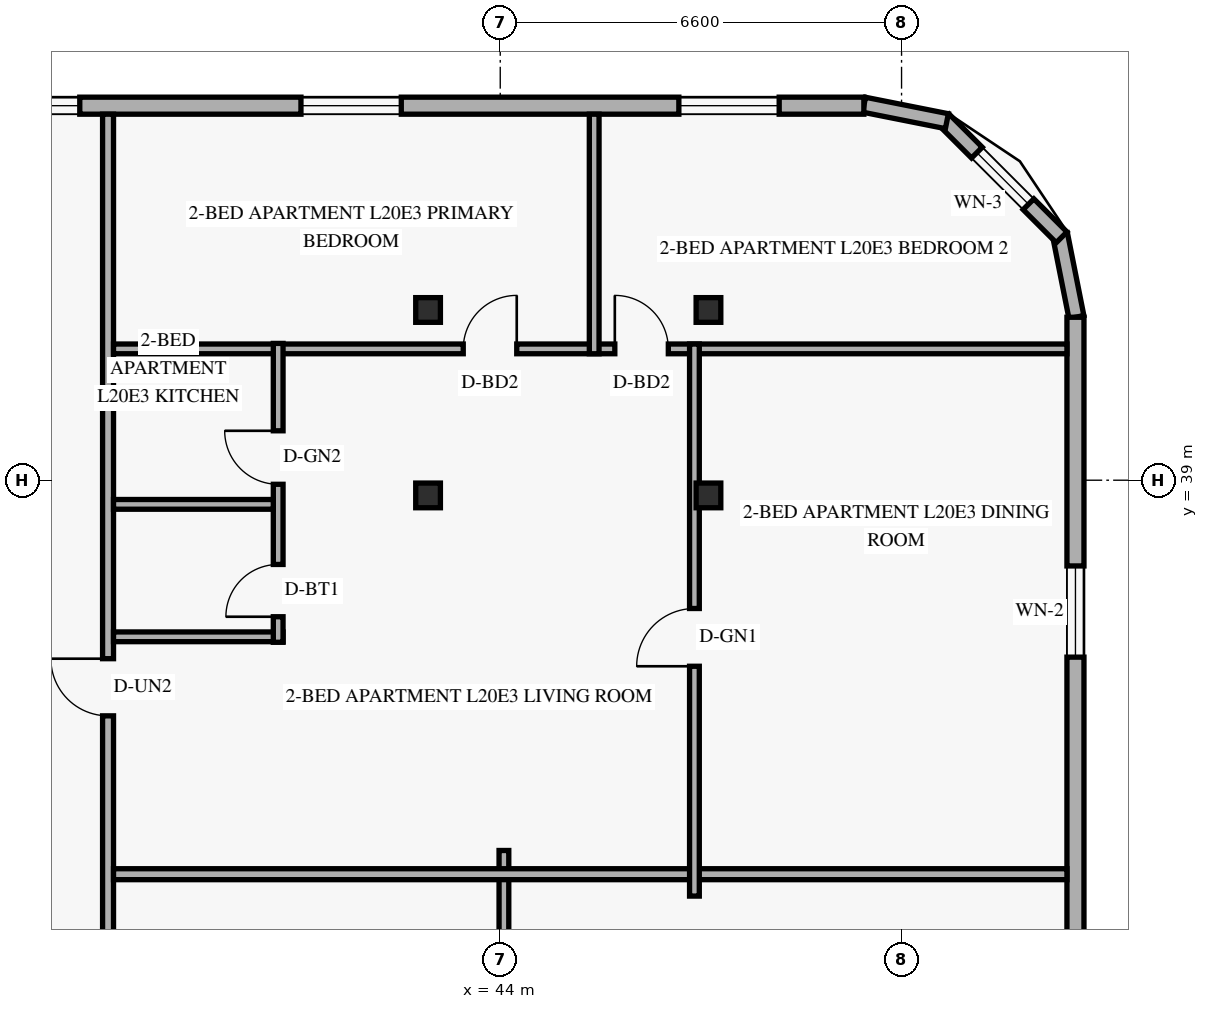
"""IFC4 building model, lengths in metres.
Left out: names, types, materials, properties, quantities, classifications, styles, units other than length and angle.
Written with IfcOpenShell. Run it as: python <this file> out.ifc"""

import sys

from ifc_helpers import new_model, si_unit, direction, frame, frame_2d, origin, origin_2d, place, context, subcontext, project, spatial, rectangle, hollow_rectangle, extrude, element, fill, save


model = new_model("IFC4")
c1 = context("Model", 3, precision=1e-05, world=origin(), true_north=direction((0.0, 1.0)))
c2 = subcontext(c1, "Body", "Model", "MODEL_VIEW")
j1 = project(units=[si_unit("LENGTHUNIT", "METRE"), si_unit("PLANEANGLEUNIT", "RADIAN")], contexts=[c1])
p1 = place(None, origin())
s1 = spatial("IfcSite", under=j1, at=p1, CompositionType="ELEMENT")
p2 = place(p1, origin())
s2 = spatial("IfcBuilding", under=s1, at=p2, CompositionType="ELEMENT")
p3 = place(p2, frame((0.0, 0.0, 80.4)))
s3 = spatial("IfcBuildingStorey", under=s2, at=p3, CompositionType="ELEMENT", Elevation=80.4)
for number, where, z_axis, x_axis in (
    (1, (42.75, 38.75, 0.0), (0.035, 0.0, 0.999), (0.0, 1.0, 0.0)),
    (2, (42.75, 41.8, 0.0), (0.035, 0.0, 0.999), (0.0, 1.0, 0.0)),
):
    element("IfcColumn", number, at=place(p3, frame(where, z_axis=z_axis, x_axis=x_axis)), inside=s3, PredefinedType="COLUMN", context=c2, shape_type="SweptSolid", body=[
        extrude(hollow_rectangle(XDim=0.406, YDim=0.406, WallThickness=0.016, at=origin_2d()), origin(), (0.0, 0.0, 1.0), 3.602),
    ])
for number, where, z_axis, x_axis in (
    (3, (47.32, 38.75, 0.0), (0.058, 0.0, 0.998), (0.0, 1.0, 0.0)),
    (4, (47.32, 41.8, 0.0), (0.058, 0.0, 0.998), (0.0, 1.0, 0.0)),
):
    element("IfcColumn", number, at=place(p3, frame(where, z_axis=z_axis, x_axis=x_axis)), inside=s3, PredefinedType="COLUMN", context=c2, shape_type="SweptSolid", body=[
        extrude(hollow_rectangle(XDim=0.406, YDim=0.406, WallThickness=0.016, at=origin_2d()), origin(), (0.0, 0.0, 1.0), 3.606),
    ])
p4 = place(p3, frame((53.476, 41.684, 0.0), z_axis=(0.0, 0.0, 1.0), x_axis=(-0.195000137217, 0.980803214965, 0.0)))
e5 = element("IfcWall", 5, at=p4, inside=s3, PredefinedType="SOLIDWALL", context=c2, shape_type="SweptSolid", body=[
    extrude(rectangle(XDim=1.388, YDim=0.25, at=frame_2d((0.694, 0.0))), origin(), (0.0, 0.0, 1.0), 3.36),
])
p5 = place(p3, frame((53.232, 42.995, 0.0), z_axis=(0.0, 0.0, 1.0), x_axis=(-0.707151344399, 0.707062215165, 0.0)))
e6 = element("IfcWall", 6, at=p5, inside=s3, PredefinedType="SOLIDWALL", context=c2, shape_type="SweptSolid", body=[
    extrude(rectangle(XDim=2.739, YDim=0.25, at=frame_2d((1.37, 0.0))), origin(), (0.0, 0.0, 1.0), 3.36),
])
p6 = place(p5, frame((0.77, 0.0, 0.85)))
e7 = element("IfcOpeningElement", 7, at=p6, cuts=e6, PredefinedType="OPENING", context=c2, shape_type="SweptSolid", body=[
    extrude(rectangle(XDim=1.2, YDim=1.5, at=frame_2d((0.6, 0.75))), frame((0.0, 0.135, 0.0), z_axis=(0.0, -1.0, 0.0), x_axis=(1.0, 0.0, 0.0)), (0.0, 0.0, 1.0), 0.27),
])
p7 = place(p3, frame((51.345, 44.905, 0.0), z_axis=(0.0, 0.0, 1.0), x_axis=(-0.980809899341, 0.19496651342, 0.0)))
e8 = element("IfcWall", 8, at=p7, inside=s3, PredefinedType="SOLIDWALL", context=c2, shape_type="SweptSolid", body=[
    extrude(rectangle(XDim=1.389, YDim=0.25, at=frame_2d((0.694, 0.0))), origin(), (0.0, 0.0, 1.0), 3.36),
])
p8 = place(p3, frame((53.46, 27.78, 0.0), z_axis=(0.0, 0.0, 1.0), x_axis=(0.0, 1.0, 0.0)))
e9 = element("IfcWall", 9, at=p8, inside=s3, PredefinedType="SOLIDWALL", context=c2, shape_type="SweptSolid", body=[
    extrude(rectangle(XDim=13.9, YDim=0.28, at=frame_2d((6.95, 0.0))), origin(), (0.0, 0.0, 1.0), 3.36),
])
p9 = place(p8, frame((1.62, 0.0, 0.85)))
e10 = element("IfcOpeningElement", 10, at=p9, cuts=e9, PredefinedType="OPENING", context=c2, shape_type="SweptSolid", body=[
    extrude(rectangle(XDim=1.5, YDim=1.55, at=frame_2d((0.75, 0.775))), frame((0.0, 0.15, 0.0), z_axis=(0.0, -1.0, 0.0), x_axis=(1.0, 0.0, 0.0)), (0.0, 0.0, 1.0), 0.3),
])
p10 = place(p8, frame((8.31, 0.0, 0.85)))
e11 = element("IfcOpeningElement", 11, at=p10, cuts=e9, PredefinedType="OPENING", context=c2, shape_type="SweptSolid", body=[
    extrude(rectangle(XDim=1.5, YDim=1.55, at=frame_2d((0.75, 0.775))), frame((0.0, 0.15, 0.0), z_axis=(0.0, -1.0, 0.0), x_axis=(1.0, 0.0, 0.0)), (0.0, 0.0, 1.0), 0.3),
])
p11 = place(p3, frame((49.98, 45.16, 0.0), z_axis=(0.0, 0.0, 1.0), x_axis=(-1.0, 0.0, 0.0)))
e12 = element("IfcWall", 12, at=p11, inside=s3, PredefinedType="SOLIDWALL", context=c2, shape_type="SweptSolid", body=[
    extrude(rectangle(XDim=36.56, YDim=0.28, at=frame_2d((18.28, 0.0))), origin(), (0.0, 0.0, 1.0), 3.36),
])
p12 = place(p11, frame((30.99, 0.0, 0.85)))
e13 = element("IfcOpeningElement", 13, at=p12, cuts=e12, PredefinedType="OPENING", context=c2, shape_type="SweptSolid", body=[
    extrude(rectangle(XDim=1.65, YDim=1.6, at=frame_2d((0.825, 0.8))), frame((0.0, 0.15, 0.0), z_axis=(0.0, -1.0, 0.0), x_axis=(1.0, 0.0, 0.0)), (0.0, 0.0, 1.0), 0.3),
])
p13 = place(p11, frame((26.68, 0.0, 0.85)))
e14 = element("IfcOpeningElement", 14, at=p13, cuts=e12, PredefinedType="OPENING", context=c2, shape_type="SweptSolid", body=[
    extrude(rectangle(XDim=1.2, YDim=1.5, at=frame_2d((0.6, 0.75))), frame((0.0, 0.15, 0.0), z_axis=(0.0, -1.0, 0.0), x_axis=(1.0, 0.0, 0.0)), (0.0, 0.0, 1.0), 0.3),
])
p14 = place(p11, frame((22.604, 0.0, 0.85)))
e15 = element("IfcOpeningElement", 15, at=p14, cuts=e12, PredefinedType="OPENING", context=c2, shape_type="SweptSolid", body=[
    extrude(rectangle(XDim=1.65, YDim=1.6, at=frame_2d((0.825, 0.8))), frame((0.0, 0.15, 0.0), z_axis=(0.0, -1.0, 0.0), x_axis=(1.0, 0.0, 0.0)), (0.0, 0.0, 1.0), 0.3),
])
p15 = place(p11, frame((16.769, 0.0, 0.85)))
e16 = element("IfcOpeningElement", 16, at=p15, cuts=e12, PredefinedType="OPENING", context=c2, shape_type="SweptSolid", body=[
    extrude(rectangle(XDim=1.65, YDim=1.6, at=frame_2d((0.825, 0.8))), frame((0.0, 0.15, 0.0), z_axis=(0.0, -1.0, 0.0), x_axis=(1.0, 0.0, 0.0)), (0.0, 0.0, 1.0), 0.3),
])
p16 = place(p11, frame((12.895, 0.0, 0.85)))
e17 = element("IfcOpeningElement", 17, at=p16, cuts=e12, PredefinedType="OPENING", context=c2, shape_type="SweptSolid", body=[
    extrude(rectangle(XDim=1.2, YDim=1.5, at=frame_2d((0.6, 0.75))), frame((0.0, 0.15, 0.0), z_axis=(0.0, -1.0, 0.0), x_axis=(1.0, 0.0, 0.0)), (0.0, 0.0, 1.0), 0.3),
])
p17 = place(p11, frame((7.607, 0.0, 0.85)))
e18 = element("IfcOpeningElement", 18, at=p17, cuts=e12, PredefinedType="OPENING", context=c2, shape_type="SweptSolid", body=[
    extrude(rectangle(XDim=1.65, YDim=1.6, at=frame_2d((0.825, 0.8))), frame((0.0, 0.15, 0.0), z_axis=(0.0, -1.0, 0.0), x_axis=(1.0, 0.0, 0.0)), (0.0, 0.0, 1.0), 0.3),
])
p18 = place(p11, frame((1.393, 0.0, 0.85)))
e19 = element("IfcOpeningElement", 19, at=p18, cuts=e12, PredefinedType="OPENING", context=c2, shape_type="SweptSolid", body=[
    extrude(rectangle(XDim=1.65, YDim=1.6, at=frame_2d((0.825, 0.8))), frame((0.0, 0.15, 0.0), z_axis=(0.0, -1.0, 0.0), x_axis=(1.0, 0.0, 0.0)), (0.0, 0.0, 1.0), 0.3),
])
p19 = place(p3, frame((37.55, 2.98, 0.0), z_axis=(0.0, 0.0, 1.0), x_axis=(0.0, 1.0, 0.0)))
e20 = element("IfcWall", 20, at=p19, inside=s3, PredefinedType="STANDARD", context=c2, shape_type="SweptSolid", body=[
    extrude(rectangle(XDim=42.04, YDim=0.18, at=frame_2d((21.02, 0.0))), origin(), (0.0, 0.0, 1.0), 2.731),
])
p20 = place(p19, frame((8.69, 0.0, 0.0)))
e21 = element("IfcOpeningElement", 21, at=p20, cuts=e20, PredefinedType="OPENING", context=c2, shape_type="SweptSolid", body=[
    extrude(rectangle(XDim=0.94, YDim=2.15, at=frame_2d((0.47, 1.075))), frame((0.0, 0.1, 0.0), z_axis=(0.0, -1.0, 0.0), x_axis=(1.0, 0.0, 0.0)), (0.0, 0.0, 1.0), 0.2),
])
p21 = place(p19, frame((19.043, 0.0, 0.0)))
e22 = element("IfcOpeningElement", 22, at=p21, cuts=e20, PredefinedType="OPENING", context=c2, shape_type="SweptSolid", body=[
    extrude(rectangle(XDim=0.94, YDim=2.15, at=frame_2d((0.47, 1.075))), frame((0.0, 0.1, 0.0), z_axis=(0.0, -1.0, 0.0), x_axis=(1.0, 0.0, 0.0)), (0.0, 0.0, 1.0), 0.2),
])
p22 = place(p19, frame((32.145, 0.0, 0.0)))
e23 = element("IfcOpeningElement", 23, at=p22, cuts=e20, PredefinedType="OPENING", context=c2, shape_type="SweptSolid", body=[
    extrude(rectangle(XDim=0.94, YDim=2.15, at=frame_2d((0.47, 1.075))), frame((0.0, 0.1, 0.0), z_axis=(0.0, -1.0, 0.0), x_axis=(1.0, 0.0, 0.0)), (0.0, 0.0, 1.0), 0.2),
])
p23 = place(p3, frame((44.061, 27.95, 0.0), z_axis=(0.0, 0.0, 1.0), x_axis=(0.0, 1.0, 0.0)))
e24 = element("IfcWall", 24, at=p23, inside=s3, PredefinedType="PARTITIONING", context=c2, shape_type="SweptSolid", body=[
    extrude(rectangle(XDim=4.96, YDim=0.16, at=frame_2d((2.48, 0.0))), origin(), (0.0, 0.0, 1.0), 2.731),
])
p24 = place(p3, frame((37.64, 32.52, 0.0), z_axis=(0.0, 0.0, 1.0), x_axis=(1.0, 0.0, 0.0)))
e25 = element("IfcWall", 25, at=p24, inside=s3, PredefinedType="PARTITIONING", context=c2, shape_type="SweptSolid", body=[
    extrude(rectangle(XDim=15.68, YDim=0.18, at=frame_2d((7.84, 0.0))), origin(), (0.0, 0.0, 1.0), 2.731),
])
p25 = place(p3, frame((37.64, 41.16, 0.0), z_axis=(0.0, 0.0, 1.0), x_axis=(1.0, 0.0, 0.0)))
e26 = element("IfcWall", 26, at=p25, inside=s3, PredefinedType="PARTITIONING", context=c2, shape_type="SweptSolid", body=[
    extrude(rectangle(XDim=15.68, YDim=0.16, at=frame_2d((7.84, 0.0))), origin(), (0.0, 0.0, 1.0), 2.731),
])
p26 = place(p25, frame((5.751, 0.0, 0.0)))
e27 = element("IfcOpeningElement", 27, at=p26, cuts=e26, PredefinedType="OPENING", context=c2, shape_type="SweptSolid", body=[
    extrude(rectangle(XDim=0.88, YDim=2.14, at=frame_2d((0.44, 1.07))), frame((0.0, 0.09, 0.0), z_axis=(0.0, -1.0, 0.0), x_axis=(1.0, 0.0, 0.0)), (0.0, 0.0, 1.0), 0.18),
])
p27 = place(p25, frame((8.244, 0.0, 0.0)))
e28 = element("IfcOpeningElement", 28, at=p27, cuts=e26, PredefinedType="OPENING", context=c2, shape_type="SweptSolid", body=[
    extrude(rectangle(XDim=0.88, YDim=2.14, at=frame_2d((0.44, 1.07))), frame((0.0, 0.09, 0.0), z_axis=(0.0, -1.0, 0.0), x_axis=(1.0, 0.0, 0.0)), (0.0, 0.0, 1.0), 0.18),
])
p28 = place(p3, frame((37.64, 36.425, 0.0), z_axis=(0.0, 0.0, 1.0), x_axis=(1.0, 0.0, 0.0)))
e29 = element("IfcWall", 29, at=p28, inside=s3, PredefinedType="PLUMBINGWALL", context=c2, shape_type="SweptSolid", body=[
    extrude(rectangle(XDim=2.788, YDim=0.16, at=frame_2d((1.394, 0.0))), origin(), (0.0, 0.0, 1.0), 3.36),
])
p29 = place(p3, frame((40.348, 36.334, 0.0), z_axis=(0.0, 0.0, 1.0), x_axis=(0.0, 1.0, 0.0)))
e30 = element("IfcWall", 30, at=p29, inside=s3, PredefinedType="PLUMBINGWALL", context=c2, shape_type="SweptSolid", body=[
    extrude(rectangle(XDim=4.916, YDim=0.16, at=frame_2d((2.458, 0.0))), origin(), (0.0, 0.0, 1.0), 2.731),
])
p30 = place(p29, frame((0.42, 0.0, 0.0)))
e31 = element("IfcOpeningElement", 31, at=p30, cuts=e30, PredefinedType="OPENING", context=c2, shape_type="SweptSolid", body=[
    extrude(rectangle(XDim=0.86, YDim=2.12, at=frame_2d((0.43, 1.06))), frame((0.0, 0.09, 0.0), z_axis=(0.0, -1.0, 0.0), x_axis=(1.0, 0.0, 0.0)), (0.0, 0.0, 1.0), 0.18),
])
p31 = place(p29, frame((2.598, 0.0, 0.0)))
e32 = element("IfcOpeningElement", 32, at=p31, cuts=e30, PredefinedType="OPENING", context=c2, shape_type="SweptSolid", body=[
    extrude(rectangle(XDim=0.88, YDim=2.12, at=frame_2d((0.44, 1.06))), frame((0.0, 0.09, 0.0), z_axis=(0.0, -1.0, 0.0), x_axis=(1.0, 0.0, 0.0)), (0.0, 0.0, 1.0), 0.18),
])
p32 = place(p3, frame((37.64, 38.603, 0.0), z_axis=(0.0, 0.0, 1.0), x_axis=(1.0, 0.0, 0.0)))
e33 = element("IfcWall", 33, at=p32, inside=s3, PredefinedType="PLUMBINGWALL", context=c2, shape_type="SweptSolid", body=[
    extrude(rectangle(XDim=2.628, YDim=0.16, at=frame_2d((1.314, 0.0))), origin(), (0.0, 0.0, 1.0), 2.731),
])
p33 = place(p3, frame((47.194, 32.16, 0.0), z_axis=(0.0, 0.0, 1.0), x_axis=(0.0, 1.0, 0.0)))
e34 = element("IfcWall", 34, at=p33, inside=s3, PredefinedType="PARTITIONING", context=c2, shape_type="SweptSolid", body=[
    extrude(rectangle(XDim=9.08, YDim=0.16, at=frame_2d((4.54, 0.0))), origin(), (0.0, 0.0, 1.0), 2.731),
])
p34 = place(p33, frame((3.78, 0.0, 0.0)))
e35 = element("IfcOpeningElement", 35, at=p34, cuts=e34, PredefinedType="OPENING", context=c2, shape_type="SweptSolid", body=[
    extrude(rectangle(XDim=0.95, YDim=2.15, at=frame_2d((0.475, 1.075))), frame((0.0, 0.09, 0.0), z_axis=(0.0, -1.0, 0.0), x_axis=(1.0, 0.0, 0.0)), (0.0, 0.0, 1.0), 0.18),
])
p35 = place(p3, frame((45.545, 41.08, 0.0), z_axis=(0.0, 0.0, 1.0), x_axis=(0.0, 1.0, 0.0)))
e36 = element("IfcWall", 36, at=p35, inside=s3, PredefinedType="PARTITIONING", context=c2, shape_type="SweptSolid", body=[
    extrude(rectangle(XDim=3.94, YDim=0.16, at=frame_2d((1.97, 0.0))), origin(), (0.0, 0.0, 1.0), 2.809),
])
p36 = place(p6, origin())
e37 = element("IfcWindow", 37, at=p36, inside=s3, PartitioningType="SINGLE_PANEL", PredefinedType="WINDOW", context=c2, shape_type="SweptSolid", body=[
    extrude(rectangle(XDim=1.2, YDim=1.5, at=frame_2d((0.6, 0.75))), frame((0.0, 0.03, 0.0), z_axis=(0.0, -1.0, 0.0), x_axis=(1.0, 0.0, 0.0)), (0.0, 0.0, 1.0), 0.06),
])
fill(e7, e37)
p37 = place(p10, origin())
e38 = element("IfcWindow", 38, at=p37, inside=s3, PartitioningType="SINGLE_PANEL", PredefinedType="WINDOW", context=c2, shape_type="SweptSolid", body=[
    extrude(rectangle(XDim=1.5, YDim=1.55, at=frame_2d((0.75, 0.775))), frame((0.0, 0.03, 0.0), z_axis=(0.0, -1.0, 0.0), x_axis=(1.0, 0.0, 0.0)), (0.0, 0.0, 1.0), 0.06),
])
fill(e11, e38)
p38 = place(p16, origin())
e39 = element("IfcWindow", 39, at=p38, inside=s3, PartitioningType="SINGLE_PANEL", PredefinedType="WINDOW", context=c2, shape_type="SweptSolid", body=[
    extrude(rectangle(XDim=1.2, YDim=1.5, at=frame_2d((0.6, 0.75))), frame((0.0, 0.03, 0.0), z_axis=(0.0, -1.0, 0.0), x_axis=(1.0, 0.0, 0.0)), (0.0, 0.0, 1.0), 0.06),
])
fill(e17, e39)
p39 = place(p17, origin())
e40 = element("IfcWindow", 40, at=p39, inside=s3, PartitioningType="SINGLE_PANEL", PredefinedType="WINDOW", context=c2, shape_type="SweptSolid", body=[
    extrude(rectangle(XDim=1.65, YDim=1.6, at=frame_2d((0.825, 0.8))), frame((0.0, 0.03, 0.0), z_axis=(0.0, -1.0, 0.0), x_axis=(1.0, 0.0, 0.0)), (0.0, 0.0, 1.0), 0.06),
])
fill(e18, e40)
p40 = place(p18, origin())
e41 = element("IfcWindow", 41, at=p40, inside=s3, PartitioningType="SINGLE_PANEL", PredefinedType="WINDOW", context=c2, shape_type="SweptSolid", body=[
    extrude(rectangle(XDim=1.65, YDim=1.6, at=frame_2d((0.825, 0.8))), frame((0.0, 0.03, 0.0), z_axis=(0.0, -1.0, 0.0), x_axis=(1.0, 0.0, 0.0)), (0.0, 0.0, 1.0), 0.06),
])
fill(e19, e41)
p41 = place(p34, origin())
e42 = element("IfcDoor", 42, at=p41, inside=s3, OperationType="SINGLE_SWING_LEFT", PredefinedType="DOOR", context=c2, shape_type="SweptSolid", body=[
    extrude(rectangle(XDim=0.95, YDim=2.15, at=frame_2d((0.475, 1.075))), frame((0.0, 0.025, 0.0), z_axis=(0.0, -1.0, 0.0), x_axis=(1.0, 0.0, 0.0)), (0.0, 0.0, 1.0), 0.05),
])
fill(e35, e42)
p42 = place(p22, origin())
e43 = element("IfcDoor", 43, at=p42, inside=s3, OperationType="SINGLE_SWING_RIGHT", PredefinedType="DOOR", context=c2, shape_type="SweptSolid", body=[
    extrude(rectangle(XDim=0.94, YDim=2.15, at=frame_2d((0.47, 1.075))), frame((0.0, 0.025, 0.0), z_axis=(0.0, -1.0, 0.0), x_axis=(1.0, 0.0, 0.0)), (0.0, 0.0, 1.0), 0.05),
])
fill(e23, e43)
p43 = place(p30, origin())
e44 = element("IfcDoor", 44, at=p43, inside=s3, OperationType="SINGLE_SWING_LEFT", PredefinedType="DOOR", context=c2, shape_type="SweptSolid", body=[
    extrude(rectangle(XDim=0.86, YDim=2.12, at=frame_2d((0.43, 1.06))), frame((0.0, 0.025, 0.0), z_axis=(0.0, -1.0, 0.0), x_axis=(1.0, 0.0, 0.0)), (0.0, 0.0, 1.0), 0.05),
])
fill(e31, e44)
p44 = place(p31, origin())
e45 = element("IfcDoor", 45, at=p44, inside=s3, OperationType="SINGLE_SWING_RIGHT", PredefinedType="DOOR", context=c2, shape_type="SweptSolid", body=[
    extrude(rectangle(XDim=0.88, YDim=2.12, at=frame_2d((0.44, 1.06))), frame((0.0, 0.025, 0.0), z_axis=(0.0, -1.0, 0.0), x_axis=(1.0, 0.0, 0.0)), (0.0, 0.0, 1.0), 0.05),
])
fill(e32, e45)
p45 = place(p26, origin())
e46 = element("IfcDoor", 46, at=p45, inside=s3, OperationType="SINGLE_SWING_RIGHT", PredefinedType="DOOR", context=c2, shape_type="SweptSolid", body=[
    extrude(rectangle(XDim=0.88, YDim=2.14, at=frame_2d((0.44, 1.07))), frame((0.0, 0.025, 0.0), z_axis=(0.0, -1.0, 0.0), x_axis=(1.0, 0.0, 0.0)), (0.0, 0.0, 1.0), 0.05),
])
fill(e27, e46)
p46 = place(p27, origin())
e47 = element("IfcDoor", 47, at=p46, inside=s3, OperationType="SINGLE_SWING_LEFT", PredefinedType="DOOR", context=c2, shape_type="SweptSolid", body=[
    extrude(rectangle(XDim=0.88, YDim=2.14, at=frame_2d((0.44, 1.07))), frame((0.0, 0.025, 0.0), z_axis=(0.0, -1.0, 0.0), x_axis=(1.0, 0.0, 0.0)), (0.0, 0.0, 1.0), 0.05),
])
fill(e28, e47)
save(model, sys.argv[1])
